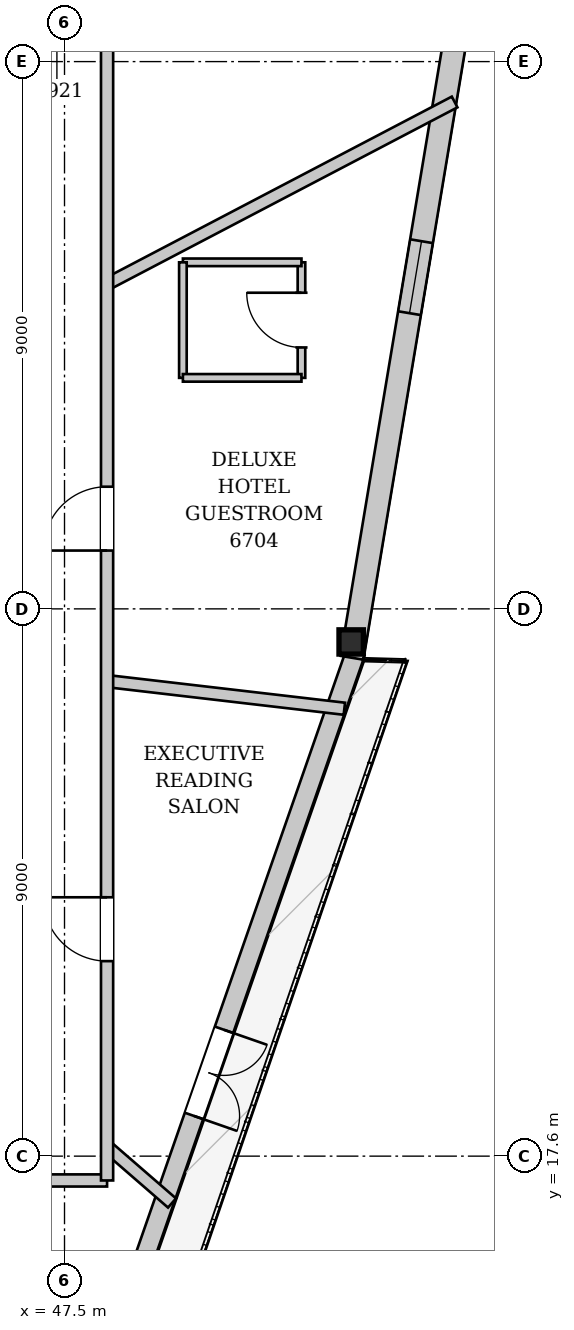
"""IFC4 building model, lengths in metres.
Left out: names, types, materials, properties, quantities, classifications, styles, units other than length and angle.
Written with IfcOpenShell. Run it as: python <this file> out.ifc"""

import sys

from ifc_helpers import new_model, si_unit, direction, frame, frame_2d, origin, origin_2d, place, context, subcontext, project, spatial, rectangle, i_section, extrude, source, transform, mapped, element, fill, save


model = new_model("IFC4")
c1 = context("Model", 3, precision=1e-05, world=origin(), true_north=direction((0.0, 1.0)))
c2 = subcontext(c1, "Body", "Model", "MODEL_VIEW")
j1 = project(units=[si_unit("LENGTHUNIT", "METRE"), si_unit("PLANEANGLEUNIT", "RADIAN")], contexts=[c1])
p1 = place(None, origin())
s1 = spatial("IfcSite", under=j1, at=p1, CompositionType="ELEMENT")
p2 = place(p1, origin())
s2 = spatial("IfcBuilding", under=s1, at=p2, CompositionType="ELEMENT")
p3 = place(p2, frame((0.0, 0.0, 252.5)))
s3 = spatial("IfcBuildingStorey", under=s2, at=p3, CompositionType="ELEMENT", Elevation=252.5)
m1 = source(origin(), c2, "Body", "SweptSolid", [
    extrude(i_section(OverallWidth=0.401, OverallDepth=0.399, WebThickness=0.022, FlangeThickness=0.034, at=origin_2d()), origin(), (0.0, 0.0, 1.0), 3.507),
])
p4 = place(p3, frame((52.416, 25.764, 0.0), z_axis=(-0.11464621978, 0.166226577313, 0.97940031105), x_axis=(-0.823196118905, -0.56775712221, 0.0)))
e1 = element("IfcColumn", 1, at=p4, inside=s3, PredefinedType="COLUMN", context=c2, shape_type="MappedRepresentation", body=[
    mapped(m1, transform((0.0, 0.0, 0.0), x_axis=(1.0, 0.0, 0.0), y_axis=(0.0, 1.0, 0.0), z_axis=(0.0, 0.0, 1.0), scale=1.0)),
])
p5 = place(p3, frame((52.264, 25.817, 0.0), z_axis=(0.0, 0.0, 1.0), x_axis=(-0.329283040193, -0.944231263749, 0.0)))
e2 = element("IfcWall", 2, at=p5, inside=s3, PredefinedType="SOLIDWALL", context=c2, shape_type="SweptSolid", body=[
    extrude(rectangle(XDim=22.663, YDim=0.32, at=frame_2d((11.332, 0.0))), origin(), (0.0, 0.0, 1.0), 2.872),
])
p6 = place(p5, frame((6.502, 0.0, 0.0)))
e3 = element("IfcOpeningElement", 3, at=p6, cuts=e2, PredefinedType="OPENING", context=c2, shape_type="SweptSolid", body=[
    extrude(rectangle(XDim=1.5, YDim=2.3, at=frame_2d((0.75, 1.15))), frame((0.0, 0.17, 0.0), z_axis=(0.0, -1.0, 0.0), x_axis=(1.0, 0.0, 0.0)), (0.0, 0.0, 1.0), 0.34),
])
p7 = place(p5, frame((15.471, 0.0, 0.402)))
e4 = element("IfcOpeningElement", 4, at=p7, cuts=e2, PredefinedType="OPENING", context=c2, shape_type="SweptSolid", body=[
    extrude(rectangle(XDim=2.6, YDim=2.35, at=frame_2d((1.3, 1.175))), frame((0.0, 0.17, 0.0), z_axis=(0.0, -1.0, 0.0), x_axis=(1.0, 0.0, 0.0)), (0.0, 0.0, 1.0), 0.34),
])
p8 = place(p3, frame((55.959, 48.15, 0.0), z_axis=(0.0, 0.0, 1.0), x_axis=(-0.164634811141, -0.986354590885, 0.0)))
e5 = element("IfcWall", 5, at=p8, inside=s3, PredefinedType="SOLIDWALL", context=c2, shape_type="SweptSolid", body=[
    extrude(rectangle(XDim=22.664, YDim=0.38, at=frame_2d((11.332, 0.0))), origin(), (0.0, 0.0, 1.0), 2.872),
])
p9 = place(p8, frame((5.746, 0.0, 0.65)))
e6 = element("IfcOpeningElement", 6, at=p9, cuts=e5, PredefinedType="OPENING", context=c2, shape_type="SweptSolid", body=[
    extrude(rectangle(XDim=1.2, YDim=1.5, at=frame_2d((0.6, 0.75))), frame((0.0, 0.2, 0.0), z_axis=(0.0, -1.0, 0.0), x_axis=(1.0, 0.0, 0.0)), (0.0, 0.0, 1.0), 0.4),
])
p10 = place(p8, frame((15.718, 0.0, 0.65)))
e7 = element("IfcOpeningElement", 7, at=p10, cuts=e5, PredefinedType="OPENING", context=c2, shape_type="SweptSolid", body=[
    extrude(rectangle(XDim=1.2, YDim=1.5, at=frame_2d((0.6, 0.75))), frame((0.0, 0.2, 0.0), z_axis=(0.0, -1.0, 0.0), x_axis=(1.0, 0.0, 0.0)), (0.0, 0.0, 1.0), 0.4),
])
p11 = place(p3, frame((48.2, 17.756, 0.0), z_axis=(0.0, 0.0, 1.0), x_axis=(0.755500982585, -0.655147514162, 0.0)))
e8 = element("IfcWall", 8, at=p11, inside=s3, PredefinedType="PARTITIONING", context=c2, shape_type="SweptSolid", body=[
    extrude(rectangle(XDim=1.414, YDim=0.2, at=frame_2d((0.707, 0.0))), origin(), (0.0, 0.0, 1.0), 3.38),
])
p12 = place(p3, frame((48.2, 25.412, 0.0), z_axis=(0.0, 0.0, 1.0), x_axis=(0.993283151491, -0.115709035791, 0.0)))
e9 = element("IfcWall", 9, at=p12, inside=s3, PredefinedType="PARTITIONING", context=c2, shape_type="SweptSolid", body=[
    extrude(rectangle(XDim=3.929, YDim=0.2, at=frame_2d((1.964, 0.0))), origin(), (0.0, 0.0, 1.0), 3.38),
])
p13 = place(p3, frame((48.2, 31.942, 0.0), z_axis=(0.0, 0.0, 1.0), x_axis=(0.885861896698, 0.463949027349, 0.0)))
e10 = element("IfcWall", 10, at=p13, inside=s3, PredefinedType="PARTITIONING", context=c2, shape_type="SweptSolid", body=[
    extrude(rectangle(XDim=6.453, YDim=0.2, at=frame_2d((3.226, 0.0))), origin(), (0.0, 0.0, 1.0), 3.38),
])
p14 = place(p3, frame((42.027, 34.15, 0.0), z_axis=(0.0, 0.0, 1.0), x_axis=(0.47056606421, 0.882364765397, 0.0)))
e11 = element("IfcWall", 11, at=p14, inside=s3, PredefinedType="PARTITIONING", context=c2, shape_type="SweptSolid", body=[
    extrude(rectangle(XDim=14.86, YDim=0.2, at=frame_2d((7.43, 0.0))), origin(), (0.0, 0.0, 1.0), 3.38),
])
p15 = place(p3, frame((51.397, 30.399, 0.0), z_axis=(0.0, 0.0, 1.0), x_axis=(0.0, 1.0, 0.0)))
e12 = element("IfcWall", 12, at=p15, inside=s3, PredefinedType="PARTITIONING", context=c2, shape_type="SweptSolid", body=[
    extrude(rectangle(XDim=1.9, YDim=0.125, at=frame_2d((0.95, 0.0))), origin(), (0.0, 0.0, 1.0), 3.38),
])
p16 = place(p15, frame((0.5, 0.0, 0.0)))
e13 = element("IfcOpeningElement", 13, at=p16, cuts=e12, PredefinedType="OPENING", context=c2, shape_type="SweptSolid", body=[
    extrude(rectangle(XDim=0.9, YDim=2.1, at=frame_2d((0.45, 1.05))), frame((0.0, 0.073, 0.0), z_axis=(0.0, -1.0, 0.0), x_axis=(1.0, 0.0, 0.0)), (0.0, 0.0, 1.0), 0.145),
])
p17 = place(p3, frame((51.397, 32.299, 0.0), z_axis=(0.0, 0.0, 1.0), x_axis=(-1.0, 0.0, 0.0)))
e14 = element("IfcWall", 14, at=p17, inside=s3, PredefinedType="PARTITIONING", context=c2, shape_type="SweptSolid", body=[
    extrude(rectangle(XDim=1.95, YDim=0.125, at=frame_2d((0.975, 0.0))), origin(), (0.0, 0.0, 1.0), 3.38),
])
p18 = place(p3, frame((49.447, 32.299, 0.0), z_axis=(0.0, 0.0, 1.0), x_axis=(0.0, -1.0, 0.0)))
e15 = element("IfcWall", 15, at=p18, inside=s3, PredefinedType="PARTITIONING", context=c2, shape_type="SweptSolid", body=[
    extrude(rectangle(XDim=1.9, YDim=0.125, at=frame_2d((0.95, 0.0))), origin(), (0.0, 0.0, 1.0), 3.38),
])
p19 = place(p3, frame((49.447, 30.399, 0.0), z_axis=(0.0, 0.0, 1.0), x_axis=(1.0, 0.0, 0.0)))
e16 = element("IfcWall", 16, at=p19, inside=s3, PredefinedType="PARTITIONING", context=c2, shape_type="SweptSolid", body=[
    extrude(rectangle(XDim=1.95, YDim=0.125, at=frame_2d((0.975, 0.0))), origin(), (0.0, 0.0, 1.0), 3.38),
])
p20 = place(p3, frame((27.8, 17.2, 0.0), z_axis=(0.0, 0.0, 1.0), x_axis=(1.0, 0.0, 0.0)))
e17 = element("IfcWall", 17, at=p20, inside=s3, PredefinedType="PARTITIONING", context=c2, shape_type="SweptSolid", body=[
    extrude(rectangle(XDim=20.4, YDim=0.2, at=frame_2d((10.2, 0.0))), origin(), (0.0, 0.0, 1.0), 3.38),
])
p21 = place(p20, frame((9.356, 0.0, 0.0)))
e18 = element("IfcOpeningElement", 18, at=p21, cuts=e17, PredefinedType="OPENING", context=c2, shape_type="SweptSolid", body=[
    extrude(rectangle(XDim=1.05, YDim=2.2, at=frame_2d((0.525, 1.1))), frame((0.0, 0.11, 0.0), z_axis=(0.0, -1.0, 0.0), x_axis=(1.0, 0.0, 0.0)), (0.0, 0.0, 1.0), 0.22),
])
p22 = place(p20, frame((17.51, 0.0, 0.0)))
e19 = element("IfcOpeningElement", 19, at=p22, cuts=e17, PredefinedType="OPENING", context=c2, shape_type="SweptSolid", body=[
    extrude(rectangle(XDim=1.05, YDim=2.2, at=frame_2d((0.525, 1.1))), frame((0.0, 0.11, 0.0), z_axis=(0.0, -1.0, 0.0), x_axis=(1.0, 0.0, 0.0)), (0.0, 0.0, 1.0), 0.22),
])
p23 = place(p20, frame((0.412, 0.0, 0.0)))
e20 = element("IfcOpeningElement", 20, at=p23, cuts=e17, PredefinedType="OPENING", context=c2, shape_type="SweptSolid", body=[
    extrude(rectangle(XDim=1.05, YDim=2.2, at=frame_2d((0.525, 1.1))), frame((0.0, 0.11, 0.0), z_axis=(0.0, -1.0, 0.0), x_axis=(1.0, 0.0, 0.0)), (0.0, 0.0, 1.0), 0.22),
])
p24 = place(p3, frame((48.2, 17.2, 0.0), z_axis=(0.0, 0.0, 1.0), x_axis=(0.0, 1.0, 0.0)))
e21 = element("IfcWall", 21, at=p24, inside=s3, PredefinedType="PARTITIONING", context=c2, shape_type="SweptSolid", body=[
    extrude(rectangle(XDim=18.8, YDim=0.2, at=frame_2d((9.4, 0.0))), origin(), (0.0, 0.0, 1.0), 3.065),
])
p25 = place(p24, frame((3.607, 0.0, 0.0)))
e22 = element("IfcOpeningElement", 22, at=p25, cuts=e21, PredefinedType="OPENING", context=c2, shape_type="SweptSolid", body=[
    extrude(rectangle(XDim=1.05, YDim=2.2, at=frame_2d((0.525, 1.1))), frame((0.0, 0.11, 0.0), z_axis=(0.0, -1.0, 0.0), x_axis=(1.0, 0.0, 0.0)), (0.0, 0.0, 1.0), 0.22),
])
p26 = place(p24, frame((10.359, 0.0, 0.0)))
e23 = element("IfcOpeningElement", 23, at=p26, cuts=e21, PredefinedType="OPENING", context=c2, shape_type="SweptSolid", body=[
    extrude(rectangle(XDim=1.05, YDim=2.2, at=frame_2d((0.525, 1.1))), frame((0.0, 0.11, 0.0), z_axis=(0.0, -1.0, 0.0), x_axis=(1.0, 0.0, 0.0)), (0.0, 0.0, 1.0), 0.22),
])
m2 = source(origin(), c2, "Body", "SweptSolid", [
    extrude(rectangle(XDim=1.5, YDim=2.3, at=frame_2d((0.75, 1.15))), frame((0.0, 0.025, 0.0), z_axis=(0.0, -1.0, 0.0), x_axis=(1.0, 0.0, 0.0)), (0.0, 0.0, 1.0), 0.05),
])
p27 = place(p6, origin())
e24 = element("IfcDoor", 24, at=p27, inside=s3, OperationType="DOUBLE_DOOR_SINGLE_SWING", PredefinedType="DOOR", context=c2, shape_type="MappedRepresentation", body=[
    mapped(m2, transform((0.0, 0.0, 0.0), x_axis=(1.0, 0.0, 0.0), y_axis=(0.0, 1.0, 0.0), z_axis=(0.0, 0.0, 1.0), scale=1.0)),
])
fill(e3, e24)
m3 = source(origin(), c2, "Body", "SweptSolid", [
    extrude(rectangle(XDim=1.2, YDim=1.5, at=frame_2d((0.6, 0.75))), frame((0.0, 0.03, 0.0), z_axis=(0.0, -1.0, 0.0), x_axis=(1.0, 0.0, 0.0)), (0.0, 0.0, 1.0), 0.06),
])
p28 = place(p10, origin())
e25 = element("IfcWindow", 25, at=p28, inside=s3, PartitioningType="SINGLE_PANEL", PredefinedType="WINDOW", context=c2, shape_type="MappedRepresentation", body=[
    mapped(m3, transform((0.0, 0.0, 0.0), x_axis=(1.0, 0.0, 0.0), y_axis=(0.0, 1.0, 0.0), z_axis=(0.0, 0.0, 1.0), scale=1.0)),
])
fill(e7, e25)
m4 = source(origin(), c2, "Body", "SweptSolid", [
    extrude(rectangle(XDim=0.9, YDim=2.1, at=frame_2d((0.45, 1.05))), frame((0.0, 0.025, 0.0), z_axis=(0.0, -1.0, 0.0), x_axis=(1.0, 0.0, 0.0)), (0.0, 0.0, 1.0), 0.05),
])
p29 = place(p16, origin())
e26 = element("IfcDoor", 26, at=p29, inside=s3, OperationType="SINGLE_SWING_RIGHT", PredefinedType="DOOR", context=c2, shape_type="MappedRepresentation", body=[
    mapped(m4, transform((0.0, 0.0, 0.0), x_axis=(1.0, 0.0, 0.0), y_axis=(0.0, 1.0, 0.0), z_axis=(0.0, 0.0, 1.0), scale=1.0)),
])
fill(e13, e26)
m5 = source(origin(), c2, "Body", "SweptSolid", [
    extrude(rectangle(XDim=1.05, YDim=2.2, at=frame_2d((0.525, 1.1))), frame((0.0, 0.025, 0.0), z_axis=(0.0, -1.0, 0.0), x_axis=(1.0, 0.0, 0.0)), (0.0, 0.0, 1.0), 0.05),
])
p30 = place(p25, origin())
e27 = element("IfcDoor", 27, at=p30, inside=s3, OperationType="SINGLE_SWING_RIGHT", PredefinedType="DOOR", context=c2, shape_type="MappedRepresentation", body=[
    mapped(m5, transform((0.0, 0.0, 0.0), x_axis=(1.0, 0.0, 0.0), y_axis=(0.0, 1.0, 0.0), z_axis=(0.0, 0.0, 1.0), scale=1.0)),
])
fill(e22, e27)
p31 = place(p26, origin())
e28 = element("IfcDoor", 28, at=p31, inside=s3, OperationType="SINGLE_SWING_LEFT", PredefinedType="DOOR", context=c2, shape_type="MappedRepresentation", body=[
    mapped(m5, transform((0.0, 0.0, 0.0), x_axis=(1.0, 0.0, 0.0), y_axis=(0.0, 1.0, 0.0), z_axis=(0.0, 0.0, 1.0), scale=1.0)),
])
fill(e23, e28)
save(model, sys.argv[1])
